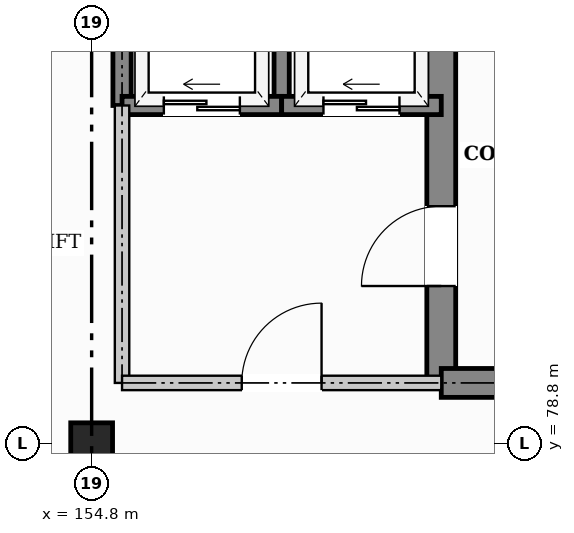
"""IFC4 building model, lengths in metres.
Left out: names, types, materials, properties, quantities, classifications, styles, units other than length and angle.
Written with IfcOpenShell. Run it as: python <this file> out.ifc"""

import sys

from ifc_helpers import new_model, si_unit, direction, frame, frame_2d, origin, origin_2d, place, context, subcontext, project, spatial, rectangle, extrude, element, fill, save


model = new_model("IFC4")
c1 = context("Model", 3, precision=1e-05, world=origin(), true_north=direction((0.0, 1.0)))
c2 = subcontext(c1, "Body", "Model", "MODEL_VIEW")
j1 = project(units=[si_unit("LENGTHUNIT", "METRE"), si_unit("PLANEANGLEUNIT", "RADIAN")], contexts=[c1])
p1 = place(None, origin())
s1 = spatial("IfcSite", under=j1, at=p1, CompositionType="ELEMENT")
p2 = place(p1, origin())
s2 = spatial("IfcBuilding", under=s1, at=p2, CompositionType="ELEMENT")
p3 = place(p2, frame((0.0, 0.0, 27.6)))
s3 = spatial("IfcBuildingStorey", under=s2, at=p3, CompositionType="ELEMENT", Elevation=27.6)
p4 = place(p3, frame((154.8, 78.8, 0.0), z_axis=(0.0, 0.0, 1.0), x_axis=(1.0, 0.0, 0.0)))
e1 = element("IfcColumn", 1, at=p4, inside=s3, PredefinedType="COLUMN", context=c2, shape_type="SweptSolid", body=[
    extrude(rectangle(XDim=0.55, YDim=0.55, at=origin_2d()), origin(), (0.0, 0.0, 1.0), 3.6),
])
p5 = place(p3, frame((159.4, 79.6, 0.0), z_axis=(0.0, 0.0, 1.0), x_axis=(0.0, 1.0, 0.0)))
e2 = element("IfcWall", 2, at=p5, inside=s3, PredefinedType="SHEAR", context=c2, shape_type="SweptSolid", body=[
    extrude(rectangle(XDim=6.0, YDim=0.38, at=frame_2d((3.0, 0.0))), origin(), (0.0, 0.0, 1.0), 3.34),
])
p6 = place(p5, frame((1.275, 0.0, 0.0)))
e3 = element("IfcOpeningElement", 3, at=p6, cuts=e2, PredefinedType="OPENING", context=c2, shape_type="SweptSolid", body=[
    extrude(rectangle(XDim=1.05, YDim=2.15, at=frame_2d((0.525, 1.075))), frame((0.0, 0.2, 0.0), z_axis=(0.0, -1.0, 0.0), x_axis=(1.0, 0.0, 0.0)), (0.0, 0.0, 1.0), 0.4),
])
p7 = place(p3, frame((159.4, 79.6, 0.0), z_axis=(0.0, 0.0, 1.0), x_axis=(1.0, 0.0, 0.0)))
e4 = element("IfcWall", 4, at=p7, inside=s3, PredefinedType="SHEAR", context=c2, shape_type="SweptSolid", body=[
    extrude(rectangle(XDim=7.0, YDim=0.38, at=frame_2d((3.5, 0.0))), origin(), (0.0, 0.0, 1.0), 3.34),
])
p8 = place(p3, frame((155.2, 83.25, 0.0), z_axis=(0.0, 0.0, 1.0), x_axis=(0.0, 1.0, 0.0)))
e5 = element("IfcWall", 5, at=p8, inside=s3, PredefinedType="SHEAR", context=c2, shape_type="SweptSolid", body=[
    extrude(rectangle(XDim=2.35, YDim=0.24, at=frame_2d((1.175, 0.0))), origin(), (0.0, 0.0, 1.0), 3.34),
])
p9 = place(p3, frame((157.3, 83.25, 0.0), z_axis=(0.0, 0.0, 1.0), x_axis=(0.0, 1.0, 0.0)))
e6 = element("IfcWall", 6, at=p9, inside=s3, PredefinedType="SHEAR", context=c2, shape_type="SweptSolid", body=[
    extrude(rectangle(XDim=2.35, YDim=0.2, at=frame_2d((1.175, 0.0))), origin(), (0.0, 0.0, 1.0), 3.34),
])
p10 = place(p3, frame((155.2, 83.25, 0.0), z_axis=(0.0, 0.0, 1.0), x_axis=(1.0, 0.0, 0.0)))
e7 = element("IfcWall", 7, at=p10, inside=s3, PredefinedType="SHEAR", context=c2, shape_type="SweptSolid", body=[
    extrude(rectangle(XDim=2.1, YDim=0.24, at=frame_2d((1.05, 0.0))), origin(), (0.0, 0.0, 1.0), 3.34),
])
p11 = place(p10, frame((0.55, 0.0, 0.0)))
e8 = element("IfcOpeningElement", 8, at=p11, cuts=e7, PredefinedType="OPENING", context=c2, shape_type="SweptSolid", body=[
    extrude(rectangle(XDim=1.0, YDim=2.1, at=frame_2d((0.5, 1.05))), frame((0.0, 0.13, 0.0), z_axis=(0.0, -1.0, 0.0), x_axis=(1.0, 0.0, 0.0)), (0.0, 0.0, 1.0), 0.26),
])
p12 = place(p3, frame((157.3, 83.25, 0.0), z_axis=(0.0, 0.0, 1.0), x_axis=(1.0, 0.0, 0.0)))
e9 = element("IfcWall", 9, at=p12, inside=s3, PredefinedType="SHEAR", context=c2, shape_type="SweptSolid", body=[
    extrude(rectangle(XDim=2.1, YDim=0.24, at=frame_2d((1.05, 0.0))), origin(), (0.0, 0.0, 1.0), 3.34),
])
p13 = place(p12, frame((0.55, 0.0, 0.0)))
e10 = element("IfcOpeningElement", 10, at=p13, cuts=e9, PredefinedType="OPENING", context=c2, shape_type="SweptSolid", body=[
    extrude(rectangle(XDim=1.0, YDim=2.1, at=frame_2d((0.5, 1.05))), frame((0.0, 0.13, 0.0), z_axis=(0.0, -1.0, 0.0), x_axis=(1.0, 0.0, 0.0)), (0.0, 0.0, 1.0), 0.26),
])
p14 = place(p3, frame((155.2, 79.6, 0.0), z_axis=(0.0, 0.0, 1.0), x_axis=(0.0, 1.0, 0.0)))
e11 = element("IfcWall", 11, at=p14, inside=s3, PredefinedType="PARTITIONING", context=c2, shape_type="SweptSolid", body=[
    extrude(rectangle(XDim=3.65, YDim=0.19, at=frame_2d((1.825, 0.0))), origin(), (0.0, 0.0, 1.0), 3.34),
])
p15 = place(p3, frame((155.2, 79.6, 0.0), z_axis=(0.0, 0.0, 1.0), x_axis=(1.0, 0.0, 0.0)))
e12 = element("IfcWall", 12, at=p15, inside=s3, PredefinedType="PARTITIONING", context=c2, shape_type="SweptSolid", body=[
    extrude(rectangle(XDim=4.2, YDim=0.19, at=frame_2d((2.1, 0.0))), origin(), (0.0, 0.0, 1.0), 3.34),
])
p16 = place(p15, frame((1.575, 0.0, 0.0)))
e13 = element("IfcOpeningElement", 13, at=p16, cuts=e12, PredefinedType="OPENING", context=c2, shape_type="SweptSolid", body=[
    extrude(rectangle(XDim=1.05, YDim=2.15, at=frame_2d((0.525, 1.075))), frame((0.0, 0.105, 0.0), z_axis=(0.0, -1.0, 0.0), x_axis=(1.0, 0.0, 0.0)), (0.0, 0.0, 1.0), 0.21),
])
p17 = place(p6, origin())
e14 = element("IfcDoor", 14, at=p17, inside=s3, OperationType="SINGLE_SWING_LEFT", PredefinedType="DOOR", context=c2, shape_type="SweptSolid", body=[
    extrude(rectangle(XDim=1.05, YDim=2.15, at=frame_2d((0.525, 1.075))), frame((0.0, 0.025, 0.0), z_axis=(0.0, -1.0, 0.0), x_axis=(1.0, 0.0, 0.0)), (0.0, 0.0, 1.0), 0.05),
])
fill(e3, e14)
p18 = place(p11, origin())
e15 = element("IfcDoor", 15, at=p18, inside=s3, OperationType="SLIDING_TO_LEFT", PredefinedType="DOOR", context=c2, shape_type="SweptSolid", body=[
    extrude(rectangle(XDim=1.0, YDim=2.1, at=frame_2d((0.5, 1.05))), frame((0.0, 0.025, 0.0), z_axis=(0.0, -1.0, 0.0), x_axis=(1.0, 0.0, 0.0)), (0.0, 0.0, 1.0), 0.05),
])
fill(e8, e15)
p19 = place(p13, origin())
e16 = element("IfcDoor", 16, at=p19, inside=s3, OperationType="SLIDING_TO_LEFT", PredefinedType="DOOR", context=c2, shape_type="SweptSolid", body=[
    extrude(rectangle(XDim=1.0, YDim=2.1, at=frame_2d((0.5, 1.05))), frame((0.0, 0.025, 0.0), z_axis=(0.0, -1.0, 0.0), x_axis=(1.0, 0.0, 0.0)), (0.0, 0.0, 1.0), 0.05),
])
fill(e10, e16)
p20 = place(p16, origin())
e17 = element("IfcDoor", 17, at=p20, inside=s3, OperationType="SINGLE_SWING_RIGHT", PredefinedType="DOOR", context=c2, shape_type="SweptSolid", body=[
    extrude(rectangle(XDim=1.05, YDim=2.15, at=frame_2d((0.525, 1.075))), frame((0.0, 0.025, 0.0), z_axis=(0.0, -1.0, 0.0), x_axis=(1.0, 0.0, 0.0)), (0.0, 0.0, 1.0), 0.05),
])
fill(e13, e17)
save(model, sys.argv[1])
